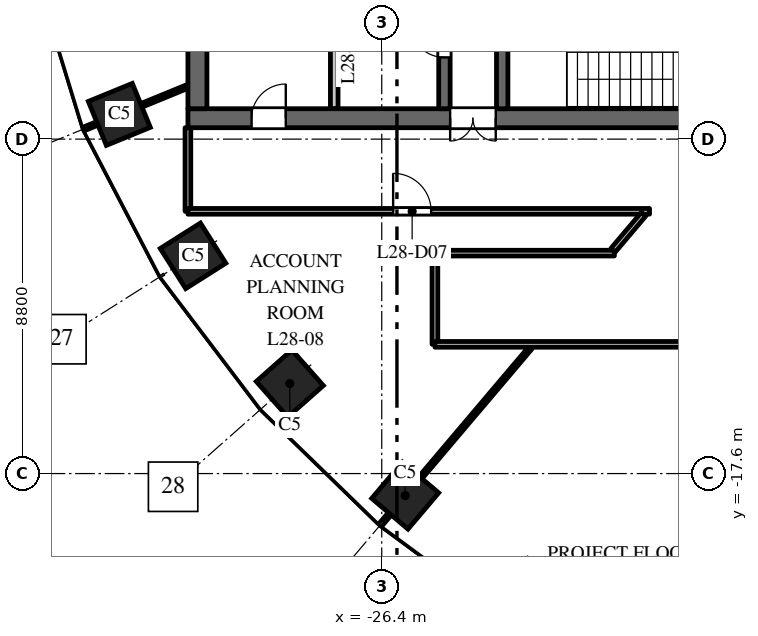
"""IFC4 building model, lengths in metres.
Left out: names, types, materials, properties, quantities, classifications, styles, units other than length and angle.
Written with IfcOpenShell. Run it as: python <this file> out.ifc"""

import sys

from ifc_helpers import new_model, si_unit, direction, frame, frame_2d, origin, origin_2d, place, context, subcontext, project, spatial, rectangle, extrude, element, fill, save


model = new_model("IFC4")
c1 = context("Model", 3, precision=1e-05, world=origin(), true_north=direction((0.0, 1.0)))
c2 = subcontext(c1, "Body", "Model", "MODEL_VIEW")
j1 = project(units=[si_unit("LENGTHUNIT", "METRE"), si_unit("PLANEANGLEUNIT", "RADIAN")], contexts=[c1])
p1 = place(None, origin())
s1 = spatial("IfcSite", under=j1, at=p1, CompositionType="ELEMENT")
p2 = place(p1, origin())
s2 = spatial("IfcBuilding", under=s1, at=p2, CompositionType="ELEMENT")
p3 = place(p2, frame((0.0, 0.0, 124.0)))
s3 = spatial("IfcBuildingStorey", under=s2, at=p3, CompositionType="ELEMENT", Elevation=124.0)
for number, where, z_axis, x_axis in (
    (1, (-33.305, -8.149, 0.0), (0.0, 0.0, 1.0), (0.379, -0.925, 0.0)),
    (2, (-31.365, -11.871, 0.0), (0.0, 0.0, 1.0), (0.535, -0.845, 0.0)),
    (3, (-28.819, -15.23, 0.0), (0.0, 0.0, 1.0), (0.663, -0.749, 0.0)),
    (4, (-25.783, -18.18, 0.0), (0.0, 0.0, 1.0), (0.763, -0.646, 0.0)),
):
    element("IfcColumn", number, at=place(p3, frame(where, z_axis=z_axis, x_axis=x_axis)), inside=s3, PredefinedType="COLUMN", context=c2, shape_type="SweptSolid", body=[
        extrude(rectangle(XDim=1.25, YDim=1.25, at=origin_2d()), origin(), (0.0, 0.0, 1.0), 4.0),
    ])
p4 = place(p3, frame((-16.5, -8.25, 0.0), z_axis=(0.0, 0.0, 1.0), x_axis=(-1.0, 0.0, 0.0)))
e5 = element("IfcWall", 5, at=p4, inside=s3, PredefinedType="SHEAR", context=c2, shape_type="SweptSolid", body=[
    extrude(rectangle(XDim=15.0, YDim=0.5, at=frame_2d((7.5, 0.0))), origin(), (0.0, 0.0, 1.0), 3.7),
])
p5 = place(p4, frame((6.9, 0.0, 0.0)))
e6 = element("IfcOpeningElement", 6, at=p5, cuts=e5, PredefinedType="OPENING", context=c2, shape_type="SweptSolid", body=[
    extrude(rectangle(XDim=1.2, YDim=2.1, at=frame_2d((0.6, 1.05))), frame((0.0, 0.26, 0.0), z_axis=(0.0, -1.0, 0.0), x_axis=(1.0, 0.0, 0.0)), (0.0, 0.0, 1.0), 0.52),
])
p6 = place(p4, frame((12.425, 0.0, 0.0)))
e7 = element("IfcOpeningElement", 7, at=p6, cuts=e5, PredefinedType="OPENING", context=c2, shape_type="SweptSolid", body=[
    extrude(rectangle(XDim=0.9, YDim=2.1, at=frame_2d((0.45, 1.05))), frame((0.0, 0.26, 0.0), z_axis=(0.0, -1.0, 0.0), x_axis=(1.0, 0.0, 0.0)), (0.0, 0.0, 1.0), 0.52),
])
p7 = place(p3, frame((-24.75, -8.0, 0.0), z_axis=(0.0, 0.0, 1.0), x_axis=(0.0, 1.0, 0.0)))
e8 = element("IfcWall", 8, at=p7, inside=s3, PredefinedType="SHEAR", context=c2, shape_type="SweptSolid", body=[
    extrude(rectangle(XDim=16.0, YDim=0.3, at=frame_2d((8.0, 0.0))), origin(), (0.0, 0.0, 1.0), 3.7),
])
p8 = place(p7, frame((4.425, 0.0, 0.0)))
e9 = element("IfcOpeningElement", 9, at=p8, cuts=e8, PredefinedType="OPENING", context=c2, shape_type="SweptSolid", body=[
    extrude(rectangle(XDim=1.1, YDim=2.1, at=frame_2d((0.55, 1.05))), frame((0.0, 0.16, 0.0), z_axis=(0.0, -1.0, 0.0), x_axis=(1.0, 0.0, 0.0)), (0.0, 0.0, 1.0), 0.32),
])
p9 = place(p7, frame((7.45, 0.0, 0.0)))
e10 = element("IfcOpeningElement", 10, at=p9, cuts=e8, PredefinedType="OPENING", context=c2, shape_type="SweptSolid", body=[
    extrude(rectangle(XDim=1.1, YDim=2.1, at=frame_2d((0.55, 1.05))), frame((0.0, 0.16, 0.0), z_axis=(0.0, -1.0, 0.0), x_axis=(1.0, 0.0, 0.0)), (0.0, 0.0, 1.0), 0.32),
])
p10 = place(p7, frame((10.425, 0.0, 0.0)))
e11 = element("IfcOpeningElement", 11, at=p10, cuts=e8, PredefinedType="OPENING", context=c2, shape_type="SweptSolid", body=[
    extrude(rectangle(XDim=1.2, YDim=2.1, at=frame_2d((0.6, 1.05))), frame((0.0, 0.16, 0.0), z_axis=(0.0, -1.0, 0.0), x_axis=(1.0, 0.0, 0.0)), (0.0, 0.0, 1.0), 0.32),
])
p11 = place(p7, frame((13.125, 0.0, 0.0)))
e12 = element("IfcOpeningElement", 12, at=p11, cuts=e8, PredefinedType="OPENING", context=c2, shape_type="SweptSolid", body=[
    extrude(rectangle(XDim=0.9, YDim=2.1, at=frame_2d((0.45, 1.05))), frame((0.0, 0.16, 0.0), z_axis=(0.0, -1.0, 0.0), x_axis=(1.0, 0.0, 0.0)), (0.0, 0.0, 1.0), 0.32),
])
p12 = place(p7, frame((14.75, 0.0, 0.0)))
e13 = element("IfcOpeningElement", 13, at=p12, cuts=e8, PredefinedType="OPENING", context=c2, shape_type="SweptSolid", body=[
    extrude(rectangle(XDim=0.9, YDim=2.1, at=frame_2d((0.45, 1.05))), frame((0.0, 0.16, 0.0), z_axis=(0.0, -1.0, 0.0), x_axis=(1.0, 0.0, 0.0)), (0.0, 0.0, 1.0), 0.32),
])
p13 = place(p7, frame((1.35, 0.0, 0.0)))
e14 = element("IfcOpeningElement", 14, at=p13, cuts=e8, PredefinedType="OPENING", context=c2, shape_type="SweptSolid", body=[
    extrude(rectangle(XDim=0.9, YDim=2.1, at=frame_2d((0.45, 1.05))), frame((0.0, 0.16, 0.0), z_axis=(0.0, -1.0, 0.0), x_axis=(1.0, 0.0, 0.0)), (0.0, 0.0, 1.0), 0.32),
])
p14 = place(p3, frame((-31.25, -8.0, 0.0), z_axis=(0.0, 0.0, 1.0), x_axis=(0.0, 1.0, 0.0)))
e15 = element("IfcWall", 15, at=p14, inside=s3, PredefinedType="SHEAR", context=c2, shape_type="SweptSolid", body=[
    extrude(rectangle(XDim=16.0, YDim=0.5, at=frame_2d((8.0, 0.0))), origin(), (0.0, 0.0, 1.0), 3.7),
])
p15 = place(p3, frame((-27.65, -8.0, 0.0), z_axis=(0.0, 0.0, 1.0), x_axis=(0.0, 1.0, 0.0)))
e16 = element("IfcWall", 16, at=p15, inside=s3, PredefinedType="PARTITIONING", context=c2, shape_type="SweptSolid", body=[
    extrude(rectangle(XDim=3.25, YDim=0.2, at=frame_2d((1.625, 0.0))), origin(), (0.0, 0.0, 1.0), 3.7),
])
p16 = place(p3, frame((-23.23, -8.0, 0.0), z_axis=(0.0, 0.0, 1.0), x_axis=(0.0, 1.0, 0.0)))
e17 = element("IfcWall", 17, at=p16, inside=s3, PredefinedType="SHEAR", context=c2, shape_type="SweptSolid", body=[
    extrude(rectangle(XDim=7.875, YDim=0.3, at=frame_2d((3.938, 0.0))), origin(), (0.0, 0.0, 1.0), 3.7),
])
p17 = place(p16, frame((5.15, 0.0, 0.0)))
e18 = element("IfcOpeningElement", 18, at=p17, cuts=e17, PredefinedType="OPENING", context=c2, shape_type="SweptSolid", body=[
    extrude(rectangle(XDim=1.1, YDim=2.1, at=frame_2d((0.55, 1.05))), frame((0.0, 0.16, 0.0), z_axis=(0.0, -1.0, 0.0), x_axis=(1.0, 0.0, 0.0)), (0.0, 0.0, 1.0), 0.32),
])
p18 = place(p3, frame((-34.234, -8.53, 0.0), z_axis=(0.0, 0.0, 1.0), x_axis=(0.925344112436, 0.379128307542, 0.0)))
e19 = element("IfcWall", 19, at=p18, inside=s3, PredefinedType="PARTITIONING", context=c2, shape_type="SweptSolid", body=[
    extrude(rectangle(XDim=2.954, YDim=0.1, at=frame_2d((1.477, 0.0))), origin(), (0.0, 0.0, 1.0), 2.9),
])
p19 = place(p3, frame((-31.5, -10.7, 0.0), z_axis=(0.0, 0.0, 1.0), x_axis=(0.0, 1.0, 0.0)))
e20 = element("IfcWall", 20, at=p19, inside=s3, PredefinedType="PARTITIONING", context=c2, shape_type="SweptSolid", body=[
    extrude(rectangle(XDim=2.2, YDim=0.15, at=frame_2d((1.1, 0.0))), origin(), (0.0, 0.0, 1.0), 3.7),
])
p20 = place(p3, frame((-31.5, -10.7, 0.0), z_axis=(0.0, 0.0, 1.0), x_axis=(1.0, 0.0, 0.0)))
e21 = element("IfcWall", 21, at=p20, inside=s3, PredefinedType="PARTITIONING", context=c2, shape_type="SweptSolid", body=[
    extrude(rectangle(XDim=12.147, YDim=0.15, at=frame_2d((6.073, 0.0))), origin(), (0.0, 0.0, 1.0), 3.1),
])
p21 = place(p20, frame((5.4, 0.0, 0.0)))
e22 = element("IfcOpeningElement", 22, at=p21, cuts=e21, PredefinedType="OPENING", context=c2, shape_type="SweptSolid", body=[
    extrude(rectangle(XDim=1.0, YDim=2.1, at=frame_2d((0.5, 1.05))), frame((0.0, 0.085, 0.0), z_axis=(0.0, -1.0, 0.0), x_axis=(1.0, 0.0, 0.0)), (0.0, 0.0, 1.0), 0.17),
])
p22 = place(p3, frame((-26.43, -18.945, 0.0), z_axis=(0.0, 0.0, 1.0), x_axis=(0.646335552338, 0.763053309923, 0.0)))
e23 = element("IfcWall", 23, at=p22, inside=s3, PredefinedType="PARTITIONING", context=c2, shape_type="SweptSolid", body=[
    extrude(rectangle(XDim=6.12, YDim=0.1, at=frame_2d((3.06, 0.0))), origin(), (0.0, 0.0, 1.0), 3.7),
])
p23 = place(p3, frame((-25.0, -14.2, 0.0), z_axis=(0.0, 0.0, 1.0), x_axis=(0.0, 1.0, 0.0)))
e24 = element("IfcWall", 24, at=p23, inside=s3, PredefinedType="PARTITIONING", context=c2, shape_type="SweptSolid", body=[
    extrude(rectangle(XDim=2.4, YDim=0.15, at=frame_2d((1.2, 0.0))), origin(), (0.0, 0.0, 1.0), 3.7),
])
p24 = place(p3, frame((-25.0, -14.2, 0.0), z_axis=(0.0, 0.0, 1.0), x_axis=(1.0, 0.0, 0.0)))
e25 = element("IfcWall", 25, at=p24, inside=s3, PredefinedType="PARTITIONING", context=c2, shape_type="SweptSolid", body=[
    extrude(rectangle(XDim=13.961, YDim=0.15, at=frame_2d((6.98, 0.0))), origin(), (0.0, 0.0, 1.0), 2.75),
])
p25 = place(p24, frame((7.734, 0.0, 0.0)))
e26 = element("IfcOpeningElement", 26, at=p25, cuts=e25, PredefinedType="OPENING", context=c2, shape_type="SweptSolid", body=[
    extrude(rectangle(XDim=1.0, YDim=2.1, at=frame_2d((0.5, 1.05))), frame((0.0, 0.085, 0.0), z_axis=(0.0, -1.0, 0.0), x_axis=(1.0, 0.0, 0.0)), (0.0, 0.0, 1.0), 0.17),
])
p26 = place(p3, frame((-25.0, -11.8, 0.0), z_axis=(0.0, 0.0, 1.0), x_axis=(1.0, 0.0, 0.0)))
e27 = element("IfcWall", 27, at=p26, inside=s3, PredefinedType="PARTITIONING", context=c2, shape_type="SweptSolid", body=[
    extrude(rectangle(XDim=4.721, YDim=0.15, at=frame_2d((2.36, 0.0))), origin(), (0.0, 0.0, 1.0), 3.7),
])
p27 = place(p3, frame((-20.313, -11.725, 0.0), z_axis=(0.0, 0.0, 1.0), x_axis=(0.646259667917, 0.763117580471, 0.0)))
e28 = element("IfcWall", 28, at=p27, inside=s3, PredefinedType="PARTITIONING", context=c2, shape_type="SweptSolid", body=[
    extrude(rectangle(XDim=1.241, YDim=0.15, at=frame_2d((0.621, 0.0))), origin(), (0.0, 0.0, 1.0), 3.7),
])
p28 = place(p5, origin())
e29 = element("IfcDoor", 29, at=p28, inside=s3, OperationType="DOUBLE_DOOR_DOUBLE_SWING", PredefinedType="DOOR", context=c2, shape_type="SweptSolid", body=[
    extrude(rectangle(XDim=1.2, YDim=2.1, at=frame_2d((0.6, 1.05))), frame((0.0, 0.025, 0.0), z_axis=(0.0, -1.0, 0.0), x_axis=(1.0, 0.0, 0.0)), (0.0, 0.0, 1.0), 0.05),
])
fill(e6, e29)
p29 = place(p13, origin())
e30 = element("IfcDoor", 30, at=p29, inside=s3, OperationType="SINGLE_SWING_LEFT", PredefinedType="DOOR", context=c2, shape_type="SweptSolid", body=[
    extrude(rectangle(XDim=0.9, YDim=2.1, at=frame_2d((0.45, 1.05))), frame((0.0, 0.025, 0.0), z_axis=(0.0, -1.0, 0.0), x_axis=(1.0, 0.0, 0.0)), (0.0, 0.0, 1.0), 0.05),
])
fill(e14, e30)
p30 = place(p6, origin())
e31 = element("IfcDoor", 31, at=p30, inside=s3, OperationType="SINGLE_SWING_LEFT", PredefinedType="DOOR", context=c2, shape_type="SweptSolid", body=[
    extrude(rectangle(XDim=0.9, YDim=2.1, at=frame_2d((0.45, 1.05))), frame((0.0, 0.025, 0.0), z_axis=(0.0, -1.0, 0.0), x_axis=(1.0, 0.0, 0.0)), (0.0, 0.0, 1.0), 0.05),
])
fill(e7, e31)
p31 = place(p21, origin())
e32 = element("IfcDoor", 32, at=p31, inside=s3, OperationType="SINGLE_SWING_LEFT", PredefinedType="DOOR", context=c2, shape_type="SweptSolid", body=[
    extrude(rectangle(XDim=1.0, YDim=2.1, at=frame_2d((0.5, 1.05))), frame((0.0, 0.025, 0.0), z_axis=(0.0, -1.0, 0.0), x_axis=(1.0, 0.0, 0.0)), (0.0, 0.0, 1.0), 0.05),
])
fill(e22, e32)
save(model, sys.argv[1])
